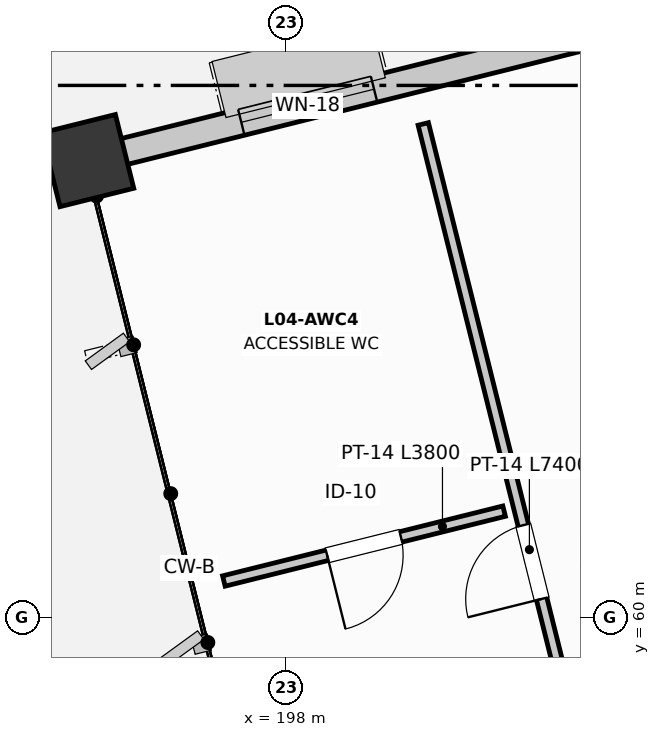
"""IFC4 building model, lengths in metres.
Left out: names, types, materials, properties, quantities, classifications, styles, units other than length and angle.
Written with IfcOpenShell. Run it as: python <this file> out.ifc"""

import sys

from ifc_helpers import new_model, si_unit, direction, frame, frame_2d, origin, origin_2d, place, context, subcontext, project, spatial, rectangle, extrude, element, fill, save


model = new_model("IFC4")
c1 = context("Model", 3, precision=1e-05, world=origin(), true_north=direction((0.0, 1.0)))
c2 = subcontext(c1, "Body", "Model", "MODEL_VIEW")
j1 = project(units=[si_unit("LENGTHUNIT", "METRE"), si_unit("PLANEANGLEUNIT", "RADIAN")], contexts=[c1])
p1 = place(None, origin())
s1 = spatial("IfcSite", under=j1, at=p1, CompositionType="ELEMENT")
p2 = place(p1, origin())
s2 = spatial("IfcBuilding", under=s1, at=p2, CompositionType="ELEMENT")
p3 = place(p2, frame((0.0, 0.0, 20.4)))
s3 = spatial("IfcBuildingStorey", under=s2, at=p3, CompositionType="ELEMENT", Elevation=20.4)
p4 = place(p3, frame((195.387, 66.011, 0.0), z_axis=(0.0, 0.0, 1.0), x_axis=(0.970295726276, 0.2419218956, 0.0)))
e1 = element("IfcColumn", 1, at=p4, inside=s3, PredefinedType="COLUMN", context=c2, shape_type="SweptSolid", body=[
    extrude(rectangle(XDim=1.0, YDim=1.0, at=origin_2d()), origin(), (0.0, 0.0, 1.0), 4.2),
])
p5 = place(p3, frame((205.61, 68.56, 0.0), z_axis=(0.0, 0.0, 1.0), x_axis=(-0.970293595336, -0.241930442171, 0.0)))
e2 = element("IfcWall", 2, at=p5, inside=s3, PredefinedType="STANDARD", context=c2, shape_type="SweptSolid", body=[
    extrude(rectangle(XDim=10.071, YDim=0.35, at=frame_2d((5.035, 0.0))), origin(), (0.0, 0.0, 1.0), 3.325),
])
p6 = place(p5, frame((1.618, 0.0, 0.85)))
e3 = element("IfcOpeningElement", 3, at=p6, cuts=e2, PredefinedType="OPENING", context=c2, shape_type="SweptSolid", body=[
    extrude(rectangle(XDim=1.8, YDim=1.65, at=frame_2d((0.9, 0.825))), frame((0.0, 0.185, 0.0), z_axis=(0.0, -1.0, 0.0), x_axis=(1.0, 0.0, 0.0)), (0.0, 0.0, 1.0), 0.37),
])
p7 = place(p5, frame((6.653, 0.0, 0.85)))
e4 = element("IfcOpeningElement", 4, at=p7, cuts=e2, PredefinedType="OPENING", context=c2, shape_type="SweptSolid", body=[
    extrude(rectangle(XDim=1.8, YDim=1.65, at=frame_2d((0.9, 0.825))), frame((0.0, 0.185, 0.0), z_axis=(0.0, -1.0, 0.0), x_axis=(1.0, 0.0, 0.0)), (0.0, 0.0, 1.0), 0.37),
])
p8 = place(p3, frame((201.64, 59.119, 0.0), z_axis=(0.0, 0.0, 1.0), x_axis=(0.970296629409, 0.241918273301, 0.0)))
e5 = element("IfcWall", 5, at=p8, inside=s3, PredefinedType="PARTITIONING", context=c2, shape_type="SweptSolid", body=[
    extrude(rectangle(XDim=17.0, YDim=0.16, at=frame_2d((8.5, 0.0))), origin(), (0.0, 0.0, 1.0), 2.865),
])
p9 = place(p3, frame((201.592, 59.313, 0.0), z_axis=(0.0, 0.0, 1.0), x_axis=(-0.241918724359, 0.97029651695, 0.0)))
e6 = element("IfcWall", 6, at=p9, inside=s3, PredefinedType="PARTITIONING", context=c2, shape_type="SweptSolid", body=[
    extrude(rectangle(XDim=7.4, YDim=0.14, at=frame_2d((3.7, 0.0))), origin(), (0.0, 0.0, 1.0), 3.555),
])
p10 = place(p9, frame((0.96, 0.0, 0.0)))
e7 = element("IfcOpeningElement", 7, at=p10, cuts=e6, PredefinedType="OPENING", context=c2, shape_type="SweptSolid", body=[
    extrude(rectangle(XDim=1.0, YDim=2.15, at=frame_2d((0.5, 1.075))), frame((0.0, 0.08, 0.0), z_axis=(0.0, -1.0, 0.0), x_axis=(1.0, 0.0, 0.0)), (0.0, 0.0, 1.0), 0.16),
])
p11 = place(p3, frame((200.866, 61.399, 0.0), z_axis=(0.0, 0.0, 1.0), x_axis=(-0.970295558209, -0.241922569678, 0.0)))
e8 = element("IfcWall", 8, at=p11, inside=s3, PredefinedType="PARTITIONING", context=c2, shape_type="SweptSolid", body=[
    extrude(rectangle(XDim=3.8, YDim=0.14, at=frame_2d((1.9, 0.0))), origin(), (0.0, 0.0, 1.0), 3.88),
])
p12 = place(p11, frame((1.4, 0.0, 0.0)))
e9 = element("IfcOpeningElement", 9, at=p12, cuts=e8, PredefinedType="OPENING", context=c2, shape_type="SweptSolid", body=[
    extrude(rectangle(XDim=1.0, YDim=2.15, at=frame_2d((0.5, 1.075))), frame((0.0, 0.08, 0.0), z_axis=(0.0, -1.0, 0.0), x_axis=(1.0, 0.0, 0.0)), (0.0, 0.0, 1.0), 0.16),
])
p13 = place(p7, origin())
e10 = element("IfcWindow", 10, at=p13, inside=s3, PartitioningType="SINGLE_PANEL", PredefinedType="WINDOW", context=c2, shape_type="SweptSolid", body=[
    extrude(rectangle(XDim=1.8, YDim=1.65, at=frame_2d((0.9, 0.825))), frame((0.0, 0.03, 0.0), z_axis=(0.0, -1.0, 0.0), x_axis=(1.0, 0.0, 0.0)), (0.0, 0.0, 1.0), 0.06),
])
fill(e4, e10)
p14 = place(p10, origin())
e11 = element("IfcDoor", 11, at=p14, inside=s3, OperationType="SINGLE_SWING_LEFT", PredefinedType="DOOR", context=c2, shape_type="SweptSolid", body=[
    extrude(rectangle(XDim=1.0, YDim=2.15, at=frame_2d((0.5, 1.075))), frame((0.0, 0.025, 0.0), z_axis=(0.0, -1.0, 0.0), x_axis=(1.0, 0.0, 0.0)), (0.0, 0.0, 1.0), 0.05),
])
fill(e7, e11)
p15 = place(p12, origin())
e12 = element("IfcDoor", 12, at=p15, inside=s3, OperationType="SINGLE_SWING_RIGHT", PredefinedType="DOOR", context=c2, shape_type="SweptSolid", body=[
    extrude(rectangle(XDim=1.0, YDim=2.15, at=frame_2d((0.5, 1.075))), frame((0.0, 0.025, 0.0), z_axis=(0.0, -1.0, 0.0), x_axis=(1.0, 0.0, 0.0)), (0.0, 0.0, 1.0), 0.05),
])
fill(e9, e12)
save(model, sys.argv[1])
